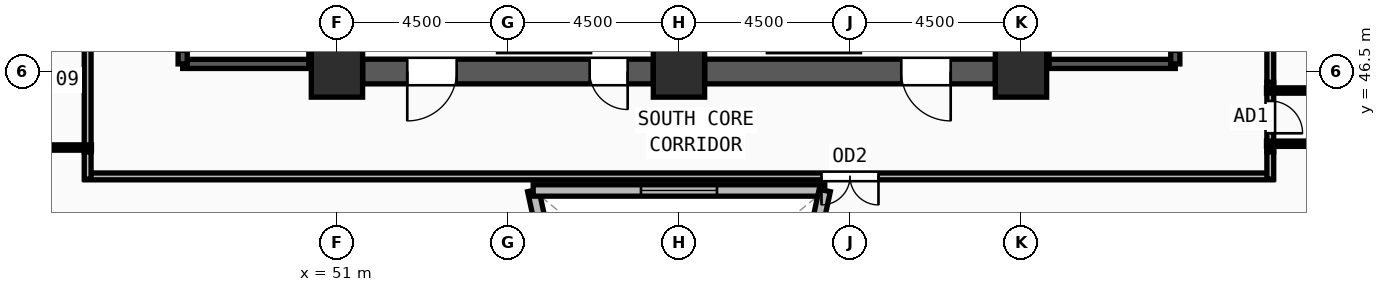
"""IFC4 building model, lengths in metres.
Left out: names, types, materials, properties, quantities, classifications, styles, units other than length and angle.
Written with IfcOpenShell. Run it as: python <this file> out.ifc"""

import sys

from ifc_helpers import new_model, si_unit, direction, frame, frame_2d, origin, origin_2d, place, context, subcontext, project, spatial, rectangle, extrude, source, transform, mapped, element, fill, save


model = new_model("IFC4")
c1 = context("Model", 3, precision=1e-05, world=origin(), true_north=direction((0.0, 1.0)))
c2 = subcontext(c1, "Body", "Model", "MODEL_VIEW")
j1 = project(units=[si_unit("LENGTHUNIT", "METRE"), si_unit("PLANEANGLEUNIT", "RADIAN")], contexts=[c1])
p1 = place(None, origin())
s1 = spatial("IfcSite", under=j1, at=p1, CompositionType="ELEMENT")
p2 = place(p1, origin())
s2 = spatial("IfcBuilding", under=s1, at=p2, CompositionType="ELEMENT")
p3 = place(p2, frame((0.0, 0.0, 201.75)))
s3 = spatial("IfcBuildingStorey", under=s2, at=p3, CompositionType="ELEMENT", Elevation=201.75)
m1 = source(origin(), c2, "Body", "SweptSolid", [
    extrude(rectangle(XDim=1.35, YDim=1.35, at=origin_2d()), origin(), (0.0, 0.0, 1.0), 3.75),
])
for number, where, z_axis, x_axis in (
    (1, (51.0, 46.5, 0.0), (0.0, 0.0, 1.0), (1.0, 0.0, 0.0)),
    (2, (60.0, 46.5, 0.0), (0.0, 0.0, 1.0), (1.0, 0.0, 0.0)),
    (3, (69.0, 46.5, 0.0), (0.0, 0.0, 1.0), (1.0, 0.0, 0.0)),
):
    element("IfcColumn", number, at=place(p3, frame(where, z_axis=z_axis, x_axis=x_axis)), inside=s3, PredefinedType="COLUMN", context=c2, shape_type="MappedRepresentation", body=[
        mapped(m1, transform((0.0, 0.0, 0.0), x_axis=(1.0, 0.0, 0.0), y_axis=(0.0, 1.0, 0.0), z_axis=(0.0, 0.0, 1.0), scale=1.0)),
    ])
p4 = place(p3, frame((37.772, 43.451, 0.0), z_axis=(0.0, 0.0, 1.0), x_axis=(0.552363814136, -0.833603153085, 0.0)))
e4 = element("IfcWall", 4, at=p4, inside=s3, PredefinedType="SOLIDWALL", context=c2, shape_type="SweptSolid", body=[
    extrude(rectangle(XDim=29.64, YDim=0.38, at=frame_2d((14.82, 0.0))), origin(), (0.0, 0.0, 1.0), 3.57),
])
m2 = source(origin(), c2, "Body", "SweptSolid", [
    extrude(rectangle(XDim=1.5, YDim=1.9, at=frame_2d((0.75, 0.95))), frame((0.0, 0.2, 0.0), z_axis=(0.0, -1.0, 0.0), x_axis=(1.0, 0.0, 0.0)), (0.0, 0.0, 1.0), 0.4),
])
p5 = place(p4, frame((6.66, 0.0, 0.55)))
e5 = element("IfcOpeningElement", 5, at=p5, cuts=e4, PredefinedType="OPENING", context=c2, shape_type="MappedRepresentation", body=[
    mapped(m2, transform((0.0, 0.0, 0.0), x_axis=(1.0, 0.0, 0.0), y_axis=(0.0, 1.0, 0.0), z_axis=(0.0, 0.0, 1.0), scale=1.0)),
])
p6 = place(p4, frame((14.07, 0.0, 0.55)))
e6 = element("IfcOpeningElement", 6, at=p6, cuts=e4, PredefinedType="OPENING", context=c2, shape_type="MappedRepresentation", body=[
    mapped(m2, transform((0.0, 0.0, 0.0), x_axis=(1.0, 0.0, 0.0), y_axis=(0.0, 1.0, 0.0), z_axis=(0.0, 0.0, 1.0), scale=1.0)),
])
p7 = place(p4, frame((21.48, 0.0, 0.55)))
e7 = element("IfcOpeningElement", 7, at=p7, cuts=e4, PredefinedType="OPENING", context=c2, shape_type="MappedRepresentation", body=[
    mapped(m2, transform((0.0, 0.0, 0.0), x_axis=(1.0, 0.0, 0.0), y_axis=(0.0, 1.0, 0.0), z_axis=(0.0, 0.0, 1.0), scale=1.0)),
])
p8 = place(p3, frame((68.325, 46.5, 0.0), z_axis=(0.0, 0.0, 1.0), x_axis=(-1.0, 0.0, 0.0)))
e8 = element("IfcWall", 8, at=p8, inside=s3, PredefinedType="SHEAR", context=c2, shape_type="SweptSolid", body=[
    extrude(rectangle(XDim=7.65, YDim=0.65, at=frame_2d((3.825, 0.0))), origin(), (0.0, 0.0, 1.0), 3.57),
])
m3 = source(origin(), c2, "Body", "SweptSolid", [
    extrude(rectangle(XDim=1.3, YDim=2.2, at=frame_2d((0.65, 1.1))), frame((0.0, 0.335, 0.0), z_axis=(0.0, -1.0, 0.0), x_axis=(1.0, 0.0, 0.0)), (0.0, 0.0, 1.0), 0.67),
])
p9 = place(p8, frame((1.175, 0.0, 0.0)))
e9 = element("IfcOpeningElement", 9, at=p9, cuts=e8, PredefinedType="OPENING", context=c2, shape_type="MappedRepresentation", body=[
    mapped(m3, transform((0.0, 0.0, 0.0), x_axis=(1.0, 0.0, 0.0), y_axis=(0.0, 1.0, 0.0), z_axis=(0.0, 0.0, 1.0), scale=1.0)),
])
p10 = place(p3, frame((59.325, 46.5, 0.0), z_axis=(0.0, 0.0, 1.0), x_axis=(-1.0, 0.0, 0.0)))
e10 = element("IfcWall", 10, at=p10, inside=s3, PredefinedType="SHEAR", context=c2, shape_type="SweptSolid", body=[
    extrude(rectangle(XDim=7.65, YDim=0.65, at=frame_2d((3.825, 0.0))), origin(), (0.0, 0.0, 1.0), 3.57),
])
p11 = place(p10, frame((5.175, 0.0, 0.0)))
e11 = element("IfcOpeningElement", 11, at=p11, cuts=e10, PredefinedType="OPENING", context=c2, shape_type="MappedRepresentation", body=[
    mapped(m3, transform((0.0, 0.0, 0.0), x_axis=(1.0, 0.0, 0.0), y_axis=(0.0, 1.0, 0.0), z_axis=(0.0, 0.0, 1.0), scale=1.0)),
])
m4 = source(origin(), c2, "Body", "SweptSolid", [
    extrude(rectangle(XDim=1.0, YDim=2.2, at=frame_2d((0.5, 1.1))), frame((0.0, 0.335, 0.0), z_axis=(0.0, -1.0, 0.0), x_axis=(1.0, 0.0, 0.0)), (0.0, 0.0, 1.0), 0.67),
])
p12 = place(p10, frame((0.675, 0.0, 0.0)))
e12 = element("IfcOpeningElement", 12, at=p12, cuts=e10, PredefinedType="OPENING", context=c2, shape_type="MappedRepresentation", body=[
    mapped(m4, transform((0.0, 0.0, 0.0), x_axis=(1.0, 0.0, 0.0), y_axis=(0.0, 1.0, 0.0), z_axis=(0.0, 0.0, 1.0), scale=1.0)),
])
p13 = place(p3, frame((46.94, 46.7, 0.0), z_axis=(0.0, 0.0, 1.0), x_axis=(1.0, 0.0, 0.0)))
e13 = element("IfcWall", 13, at=p13, inside=s3, PredefinedType="SOLIDWALL", context=c2, shape_type="SweptSolid", body=[
    extrude(rectangle(XDim=3.44, YDim=0.24, at=frame_2d((1.72, 0.0))), origin(), (0.0, 0.0, 1.0), 3.57),
])
p14 = place(p3, frame((50.38, 46.7, 0.0), z_axis=(0.0, 0.0, 1.0), x_axis=(0.0, 1.0, 0.0)))
e14 = element("IfcWall", 14, at=p14, inside=s3, PredefinedType="SOLIDWALL", context=c2, shape_type="SweptSolid", body=[
    extrude(rectangle(XDim=7.82, YDim=0.24, at=frame_2d((3.91, 0.0))), origin(), (0.0, 0.0, 1.0), 3.57),
])
p15 = place(p3, frame((46.94, 54.52, 0.0), z_axis=(0.0, 0.0, 1.0), x_axis=(0.0, -1.0, 0.0)))
e15 = element("IfcWall", 15, at=p15, inside=s3, PredefinedType="SOLIDWALL", context=c2, shape_type="SweptSolid", body=[
    extrude(rectangle(XDim=7.82, YDim=0.24, at=frame_2d((3.91, 0.0))), origin(), (0.0, 0.0, 1.0), 3.57),
])
m5 = source(origin(), c2, "Body", "SweptSolid", [
    extrude(rectangle(XDim=1.2, YDim=2.2, at=frame_2d((0.6, 1.1))), frame((0.0, 0.13, 0.0), z_axis=(0.0, -1.0, 0.0), x_axis=(1.0, 0.0, 0.0)), (0.0, 0.0, 1.0), 0.26),
])
p16 = place(p15, frame((6.3, 0.0, 0.0)))
e16 = element("IfcOpeningElement", 16, at=p16, cuts=e15, PredefinedType="OPENING", context=c2, shape_type="MappedRepresentation", body=[
    mapped(m5, transform((0.0, 0.0, 0.0), x_axis=(1.0, 0.0, 0.0), y_axis=(0.0, 1.0, 0.0), z_axis=(0.0, 0.0, 1.0), scale=1.0)),
])
p17 = place(p3, frame((69.62, 46.7, 0.0), z_axis=(0.0, 0.0, 1.0), x_axis=(1.0, 0.0, 0.0)))
e17 = element("IfcWall", 17, at=p17, inside=s3, PredefinedType="SOLIDWALL", context=c2, shape_type="SweptSolid", body=[
    extrude(rectangle(XDim=3.44, YDim=0.24, at=frame_2d((1.72, 0.0))), origin(), (0.0, 0.0, 1.0), 3.57),
])
p18 = place(p3, frame((73.06, 46.7, 0.0), z_axis=(0.0, 0.0, 1.0), x_axis=(0.0, 1.0, 0.0)))
e18 = element("IfcWall", 18, at=p18, inside=s3, PredefinedType="SOLIDWALL", context=c2, shape_type="SweptSolid", body=[
    extrude(rectangle(XDim=7.82, YDim=0.24, at=frame_2d((3.91, 0.0))), origin(), (0.0, 0.0, 1.0), 3.57),
])
p19 = place(p18, frame((0.32, 0.0, 0.0)))
e19 = element("IfcOpeningElement", 19, at=p19, cuts=e18, PredefinedType="OPENING", context=c2, shape_type="MappedRepresentation", body=[
    mapped(m5, transform((0.0, 0.0, 0.0), x_axis=(1.0, 0.0, 0.0), y_axis=(0.0, 1.0, 0.0), z_axis=(0.0, 0.0, 1.0), scale=1.0)),
])
p20 = place(p3, frame((69.62, 54.52, 0.0), z_axis=(0.0, 0.0, 1.0), x_axis=(0.0, -1.0, 0.0)))
e20 = element("IfcWall", 20, at=p20, inside=s3, PredefinedType="SOLIDWALL", context=c2, shape_type="SweptSolid", body=[
    extrude(rectangle(XDim=7.82, YDim=0.24, at=frame_2d((3.91, 0.0))), origin(), (0.0, 0.0, 1.0), 3.57),
])
p21 = place(p3, frame((57.507, 37.162, 0.0), z_axis=(0.0, 0.0, 1.0), x_axis=(-0.211444938644, 0.977389910896, 0.0)))
e21 = element("IfcWall", 21, at=p21, inside=s3, PredefinedType="SOLIDWALL", context=c2, shape_type="SweptSolid", body=[
    extrude(rectangle(XDim=6.352, YDim=0.3, at=frame_2d((3.176, 0.0))), origin(), (0.0, 0.0, 1.0), 3.57),
])
m6 = source(origin(), c2, "Body", "SweptSolid", [
    extrude(rectangle(XDim=2.0, YDim=1.9, at=frame_2d((1.0, 0.95))), frame((0.0, 0.16, 0.0), z_axis=(0.0, -1.0, 0.0), x_axis=(1.0, 0.0, 0.0)), (0.0, 0.0, 1.0), 0.32),
])
p22 = place(p21, frame((2.176, 0.0, 0.55)))
e22 = element("IfcOpeningElement", 22, at=p22, cuts=e21, PredefinedType="OPENING", context=c2, shape_type="MappedRepresentation", body=[
    mapped(m6, transform((0.0, 0.0, 0.0), x_axis=(1.0, 0.0, 0.0), y_axis=(0.0, 1.0, 0.0), z_axis=(0.0, 0.0, 1.0), scale=1.0)),
])
p23 = place(p3, frame((56.164, 43.37, 0.0), z_axis=(0.0, 0.0, 1.0), x_axis=(1.0, 0.0, 0.0)))
e23 = element("IfcWall", 23, at=p23, inside=s3, PredefinedType="SOLIDWALL", context=c2, shape_type="SweptSolid", body=[
    extrude(rectangle(XDim=7.672, YDim=0.3, at=frame_2d((3.836, 0.0))), origin(), (0.0, 0.0, 1.0), 3.57),
])
p24 = place(p23, frame((2.836, 0.0, 0.55)))
e24 = element("IfcOpeningElement", 24, at=p24, cuts=e23, PredefinedType="OPENING", context=c2, shape_type="MappedRepresentation", body=[
    mapped(m6, transform((0.0, 0.0, 0.0), x_axis=(1.0, 0.0, 0.0), y_axis=(0.0, 1.0, 0.0), z_axis=(0.0, 0.0, 1.0), scale=1.0)),
])
p25 = place(p3, frame((63.836, 43.37, 0.0), z_axis=(0.0, 0.0, 1.0), x_axis=(-0.211444938644, -0.977389910896, 0.0)))
e25 = element("IfcWall", 25, at=p25, inside=s3, PredefinedType="SOLIDWALL", context=c2, shape_type="SweptSolid", body=[
    extrude(rectangle(XDim=6.352, YDim=0.3, at=frame_2d((3.176, 0.0))), origin(), (0.0, 0.0, 1.0), 3.57),
])
p26 = place(p25, frame((2.176, 0.0, 0.55)))
e26 = element("IfcOpeningElement", 26, at=p26, cuts=e25, PredefinedType="OPENING", context=c2, shape_type="MappedRepresentation", body=[
    mapped(m6, transform((0.0, 0.0, 0.0), x_axis=(1.0, 0.0, 0.0), y_axis=(0.0, 1.0, 0.0), z_axis=(0.0, 0.0, 1.0), scale=1.0)),
])
p27 = place(p3, frame((75.63, 43.74, 0.0), z_axis=(0.0, 0.0, 1.0), x_axis=(-1.0, 0.0, 0.0)))
e27 = element("IfcWall", 27, at=p27, inside=s3, PredefinedType="PARTITIONING", context=c2, shape_type="SweptSolid", body=[
    extrude(rectangle(XDim=31.26, YDim=0.18, at=frame_2d((15.63, 0.0))), origin(), (0.0, 0.0, 1.0), 3.57),
])
m7 = source(origin(), c2, "Body", "SweptSolid", [
    extrude(rectangle(XDim=1.5, YDim=2.2, at=frame_2d((0.75, 1.1))), frame((0.0, 0.1, 0.0), z_axis=(0.0, -1.0, 0.0), x_axis=(1.0, 0.0, 0.0)), (0.0, 0.0, 1.0), 0.2),
])
p28 = place(p27, frame((10.38, 0.0, 0.0)))
e28 = element("IfcOpeningElement", 28, at=p28, cuts=e27, PredefinedType="OPENING", context=c2, shape_type="MappedRepresentation", body=[
    mapped(m7, transform((0.0, 0.0, 0.0), x_axis=(1.0, 0.0, 0.0), y_axis=(0.0, 1.0, 0.0), z_axis=(0.0, 0.0, 1.0), scale=1.0)),
])
p29 = place(p3, frame((75.56, 46.215, 0.0), z_axis=(0.0, 0.0, 1.0), x_axis=(0.0, -1.0, 0.0)))
e29 = element("IfcWall", 29, at=p29, inside=s3, PredefinedType="PARTITIONING", context=c2, shape_type="SweptSolid", body=[
    extrude(rectangle(XDim=1.83, YDim=0.18, at=frame_2d((0.915, 0.0))), origin(), (0.0, 0.0, 1.0), 3.57),
])
m8 = source(origin(), c2, "Body", "SweptSolid", [
    extrude(rectangle(XDim=0.85, YDim=2.1, at=frame_2d((0.425, 1.05))), frame((0.0, 0.1, 0.0), z_axis=(0.0, -1.0, 0.0), x_axis=(1.0, 0.0, 0.0)), (0.0, 0.0, 1.0), 0.2),
])
p30 = place(p29, frame((0.49, 0.0, 0.0)))
e30 = element("IfcOpeningElement", 30, at=p30, cuts=e29, PredefinedType="OPENING", context=c2, shape_type="MappedRepresentation", body=[
    mapped(m8, transform((0.0, 0.0, 0.0), x_axis=(1.0, 0.0, 0.0), y_axis=(0.0, 1.0, 0.0), z_axis=(0.0, 0.0, 1.0), scale=1.0)),
])
p31 = place(p3, frame((75.56, 55.715, 0.0), z_axis=(0.0, 0.0, 1.0), x_axis=(0.0, -1.0, 0.0)))
e31 = element("IfcWall", 31, at=p31, inside=s3, PredefinedType="PARTITIONING", context=c2, shape_type="SweptSolid", body=[
    extrude(rectangle(XDim=9.5, YDim=0.18, at=frame_2d((4.75, 0.0))), origin(), (0.0, 0.0, 1.0), 3.57),
])
m9 = source(origin(), c2, "Body", "SweptSolid", [
    extrude(rectangle(XDim=1.0, YDim=2.2, at=frame_2d((0.5, 1.1))), frame((0.0, 0.1, 0.0), z_axis=(0.0, -1.0, 0.0), x_axis=(1.0, 0.0, 0.0)), (0.0, 0.0, 1.0), 0.2),
])
p32 = place(p31, frame((4.25, 0.0, 0.0)))
e32 = element("IfcOpeningElement", 32, at=p32, cuts=e31, PredefinedType="OPENING", context=c2, shape_type="MappedRepresentation", body=[
    mapped(m9, transform((0.0, 0.0, 0.0), x_axis=(1.0, 0.0, 0.0), y_axis=(0.0, 1.0, 0.0), z_axis=(0.0, 0.0, 1.0), scale=1.0)),
])
p33 = place(p3, frame((44.44, 44.385, 0.0), z_axis=(0.0, 0.0, 1.0), x_axis=(0.0, 1.0, 0.0)))
e33 = element("IfcWall", 33, at=p33, inside=s3, PredefinedType="PARTITIONING", context=c2, shape_type="SweptSolid", body=[
    extrude(rectangle(XDim=3.825, YDim=0.18, at=frame_2d((1.913, 0.0))), origin(), (0.0, 0.0, 1.0), 3.57),
])
for number, where, z_axis, x_axis in (
    (34, (75.56, 44.385, 0.0), (0.0, 0.0, 1.0), (0.0, -1.0, 0.0)),
    (35, (44.44, 43.67, 0.0), (0.0, 0.0, 1.0), (0.0, 1.0, 0.0)),
):
    element("IfcWall", number, at=place(p3, frame(where, z_axis=z_axis, x_axis=x_axis)), inside=s3, PredefinedType="PARTITIONING", context=c2, shape_type="SweptSolid", body=[
        extrude(rectangle(XDim=0.715, YDim=0.18, at=frame_2d((0.357, 0.0))), origin(), (0.0, 0.0, 1.0), 3.57),
    ])
p34 = place(p3, frame((44.54, 44.5, 0.0), z_axis=(0.0, 0.0, 1.0), x_axis=(-1.0, 0.0, 0.0)))
e36 = element("IfcWall", 36, at=p34, inside=s3, PredefinedType="PARTITIONING", context=c2, shape_type="SweptSolid", body=[
    extrude(rectangle(XDim=8.066, YDim=0.14, at=frame_2d((4.033, 0.0))), origin(), (0.0, 0.0, 1.0), 3.57),
])
p35 = place(p3, frame((75.46, 44.6, 0.0), z_axis=(0.0, 0.0, 1.0), x_axis=(1.0, 0.0, 0.0)))
e37 = element("IfcWall", 37, at=p35, inside=s3, PredefinedType="PARTITIONING", context=c2, shape_type="SweptSolid", body=[
    extrude(rectangle(XDim=7.771, YDim=0.14, at=frame_2d((3.885, 0.0))), origin(), (0.0, 0.0, 1.0), 3.57),
])
p36 = place(p3, frame((75.46, 46.0, 0.0), z_axis=(0.0, 0.0, 1.0), x_axis=(1.0, 0.0, 0.0)))
e38 = element("IfcWall", 38, at=p36, inside=s3, PredefinedType="PARTITIONING", context=c2, shape_type="SweptSolid", body=[
    extrude(rectangle(XDim=8.468, YDim=0.14, at=frame_2d((4.234, 0.0))), origin(), (0.0, 0.0, 1.0), 3.57),
])
m10 = source(origin(), c2, "Body", "SweptSolid", [
    extrude(rectangle(XDim=1.3, YDim=2.2, at=frame_2d((0.65, 1.1))), frame((0.0, 0.025, 0.0), z_axis=(0.0, -1.0, 0.0), x_axis=(1.0, 0.0, 0.0)), (0.0, 0.0, 1.0), 0.05),
])
p37 = place(p11, origin())
e39 = element("IfcDoor", 39, at=p37, inside=s3, OperationType="SINGLE_SWING_RIGHT", PredefinedType="DOOR", context=c2, shape_type="MappedRepresentation", body=[
    mapped(m10, transform((0.0, 0.0, 0.0), x_axis=(1.0, 0.0, 0.0), y_axis=(0.0, 1.0, 0.0), z_axis=(0.0, 0.0, 1.0), scale=1.0)),
])
fill(e11, e39)
m11 = source(origin(), c2, "Body", "SweptSolid", [
    extrude(rectangle(XDim=1.0, YDim=2.2, at=frame_2d((0.5, 1.1))), frame((0.0, 0.025, 0.0), z_axis=(0.0, -1.0, 0.0), x_axis=(1.0, 0.0, 0.0)), (0.0, 0.0, 1.0), 0.05),
])
p38 = place(p12, origin())
e40 = element("IfcDoor", 40, at=p38, inside=s3, OperationType="SINGLE_SWING_LEFT", PredefinedType="DOOR", context=c2, shape_type="MappedRepresentation", body=[
    mapped(m11, transform((0.0, 0.0, 0.0), x_axis=(1.0, 0.0, 0.0), y_axis=(0.0, 1.0, 0.0), z_axis=(0.0, 0.0, 1.0), scale=1.0)),
])
fill(e12, e40)
p39 = place(p9, origin())
e41 = element("IfcDoor", 41, at=p39, inside=s3, OperationType="SINGLE_SWING_LEFT", PredefinedType="DOOR", context=c2, shape_type="MappedRepresentation", body=[
    mapped(m10, transform((0.0, 0.0, 0.0), x_axis=(1.0, 0.0, 0.0), y_axis=(0.0, 1.0, 0.0), z_axis=(0.0, 0.0, 1.0), scale=1.0)),
])
fill(e9, e41)
m12 = source(origin(), c2, "Body", "SweptSolid", [
    extrude(rectangle(XDim=2.0, YDim=1.9, at=frame_2d((1.0, 0.95))), frame((0.0, 0.03, 0.0), z_axis=(0.0, -1.0, 0.0), x_axis=(1.0, 0.0, 0.0)), (0.0, 0.0, 1.0), 0.06),
])
p40 = place(p24, origin())
e42 = element("IfcWindow", 42, at=p40, inside=s3, PartitioningType="DOUBLE_PANEL_VERTICAL", PredefinedType="WINDOW", context=c2, shape_type="MappedRepresentation", body=[
    mapped(m12, transform((0.0, 0.0, 0.0), x_axis=(1.0, 0.0, 0.0), y_axis=(0.0, 1.0, 0.0), z_axis=(0.0, 0.0, 1.0), scale=1.0)),
])
fill(e24, e42)
m13 = source(origin(), c2, "Body", "SweptSolid", [
    extrude(rectangle(XDim=1.5, YDim=2.2, at=frame_2d((0.75, 1.1))), frame((0.0, 0.025, 0.0), z_axis=(0.0, -1.0, 0.0), x_axis=(1.0, 0.0, 0.0)), (0.0, 0.0, 1.0), 0.05),
])
p41 = place(p28, origin())
e43 = element("IfcDoor", 43, at=p41, inside=s3, OperationType="DOUBLE_DOOR_SINGLE_SWING", PredefinedType="DOOR", context=c2, shape_type="MappedRepresentation", body=[
    mapped(m13, transform((0.0, 0.0, 0.0), x_axis=(1.0, 0.0, 0.0), y_axis=(0.0, 1.0, 0.0), z_axis=(0.0, 0.0, 1.0), scale=1.0)),
])
fill(e28, e43)
m14 = source(origin(), c2, "Body", "SweptSolid", [
    extrude(rectangle(XDim=0.85, YDim=2.1, at=frame_2d((0.425, 1.05))), frame((0.0, 0.025, 0.0), z_axis=(0.0, -1.0, 0.0), x_axis=(1.0, 0.0, 0.0)), (0.0, 0.0, 1.0), 0.05),
])
p42 = place(p30, origin())
e44 = element("IfcDoor", 44, at=p42, inside=s3, OperationType="SINGLE_SWING_RIGHT", PredefinedType="DOOR", context=c2, shape_type="MappedRepresentation", body=[
    mapped(m14, transform((0.0, 0.0, 0.0), x_axis=(1.0, 0.0, 0.0), y_axis=(0.0, 1.0, 0.0), z_axis=(0.0, 0.0, 1.0), scale=1.0)),
])
fill(e30, e44)
save(model, sys.argv[1])
